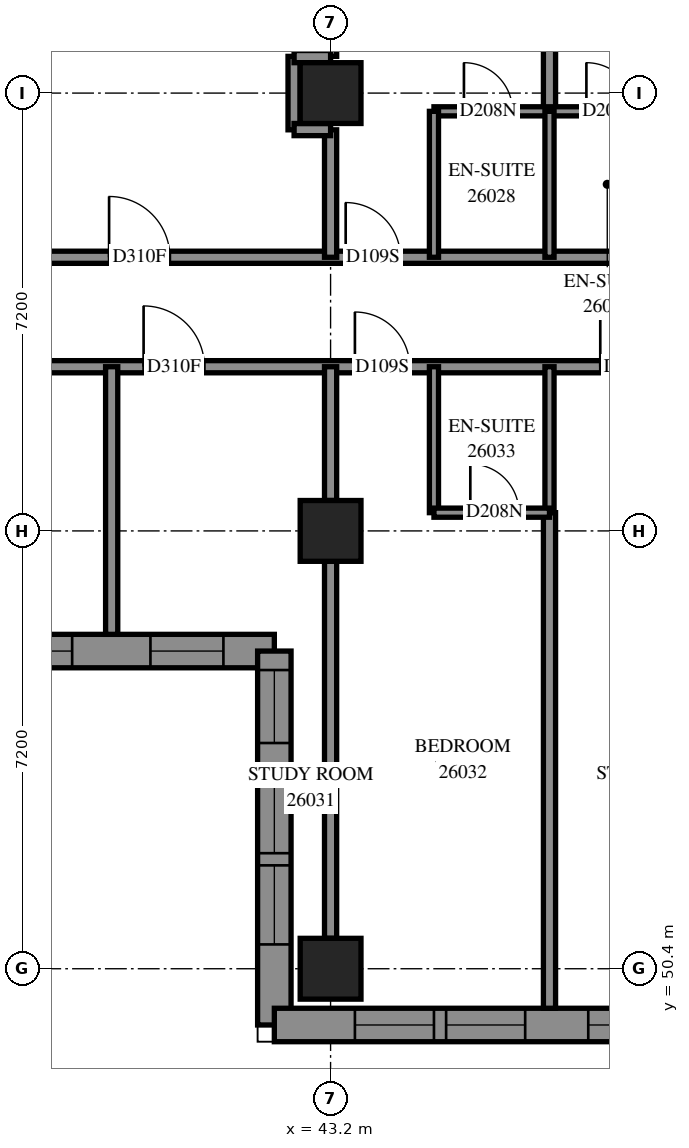
"""IFC4 building model, lengths in metres.
Left out: names, types, materials, properties, quantities, classifications, styles, units other than length and angle.
Written with IfcOpenShell. Run it as: python <this file> out.ifc"""

import sys

from ifc_helpers import new_model, si_unit, direction, frame, frame_2d, origin, origin_2d, place, context, subcontext, project, spatial, polyline, rectangle, outline, extrude, element, fill, save


model = new_model("IFC4")
c1 = context("Model", 3, precision=1e-05, world=origin(), true_north=direction((0.0, 1.0)))
c2 = subcontext(c1, "Body", "Model", "MODEL_VIEW")
j1 = project(units=[si_unit("LENGTHUNIT", "METRE"), si_unit("PLANEANGLEUNIT", "RADIAN")], contexts=[c1])
p1 = place(None, origin())
s1 = spatial("IfcSite", under=j1, at=p1, CompositionType="ELEMENT")
p2 = place(p1, origin())
s2 = spatial("IfcBuilding", under=s1, at=p2, CompositionType="ELEMENT")
p3 = place(p2, frame((0.0, 0.0, 98.2)))
s3 = spatial("IfcBuildingStorey", under=s2, at=p3, CompositionType="ELEMENT", Elevation=98.2)
for number, where, z_axis, x_axis in (
    (1, (43.2, 50.4, 0.0), (0.0, 0.0, 1.0), (1.0, 0.0, 0.0)),
    (2, (43.2, 57.6, 0.0), (0.0, 0.0, 1.0), (1.0, 0.0, 0.0)),
    (3, (43.2, 64.8, 0.0), (0.0, 0.0, 1.0), (1.0, 0.0, 0.0)),
):
    element("IfcColumn", number, at=place(p3, frame(where, z_axis=z_axis, x_axis=x_axis)), inside=s3, PredefinedType="COLUMN", context=c2, shape_type="SweptSolid", body=[
        extrude(rectangle(XDim=1.0, YDim=1.0, at=origin_2d()), origin(), (0.0, 0.0, 1.0), 3.1),
    ])
p4 = place(p3, frame((27.875, 55.624, 0.0), z_axis=(0.0, 0.0, 1.0), x_axis=(1.0, 0.0, 0.0)))
e4 = element("IfcWall", 4, at=p4, inside=s3, PredefinedType="SOLIDWALL", context=c2, shape_type="SweptSolid", body=[
    extrude(outline(polyline([(-0.275, -0.275), (14.125, -0.275), (14.675, 0.275), (0.275, 0.275), (-0.275, -0.275)])), origin(), (0.0, 0.0, 1.0), 3.1),
])
p5 = place(p4, frame((1.175, 0.0, 0.5)))
e5 = element("IfcOpeningElement", 5, at=p5, cuts=e4, PredefinedType="OPENING", context=c2, shape_type="SweptSolid", body=[
    extrude(rectangle(XDim=1.3, YDim=2.45, at=frame_2d((0.65, 1.225))), frame((0.0, 0.285, 0.0), z_axis=(0.0, -1.0, 0.0), x_axis=(1.0, 0.0, 0.0)), (0.0, 0.0, 1.0), 0.57),
])
p6 = place(p4, frame((2.675, 0.0, 0.5)))
e6 = element("IfcOpeningElement", 6, at=p6, cuts=e4, PredefinedType="OPENING", context=c2, shape_type="SweptSolid", body=[
    extrude(rectangle(XDim=1.3, YDim=2.45, at=frame_2d((0.65, 1.225))), frame((0.0, 0.285, 0.0), z_axis=(0.0, -1.0, 0.0), x_axis=(1.0, 0.0, 0.0)), (0.0, 0.0, 1.0), 0.57),
])
p7 = place(p4, frame((4.925, 0.0, 0.5)))
e7 = element("IfcOpeningElement", 7, at=p7, cuts=e4, PredefinedType="OPENING", context=c2, shape_type="SweptSolid", body=[
    extrude(rectangle(XDim=1.3, YDim=2.45, at=frame_2d((0.65, 1.225))), frame((0.0, 0.285, 0.0), z_axis=(0.0, -1.0, 0.0), x_axis=(1.0, 0.0, 0.0)), (0.0, 0.0, 1.0), 0.57),
])
p8 = place(p4, frame((6.425, 0.0, 0.5)))
e8 = element("IfcOpeningElement", 8, at=p8, cuts=e4, PredefinedType="OPENING", context=c2, shape_type="SweptSolid", body=[
    extrude(rectangle(XDim=1.3, YDim=2.45, at=frame_2d((0.65, 1.225))), frame((0.0, 0.285, 0.0), z_axis=(0.0, -1.0, 0.0), x_axis=(1.0, 0.0, 0.0)), (0.0, 0.0, 1.0), 0.57),
])
p9 = place(p4, frame((8.275, 0.0, 0.5)))
e9 = element("IfcOpeningElement", 9, at=p9, cuts=e4, PredefinedType="OPENING", context=c2, shape_type="SweptSolid", body=[
    extrude(rectangle(XDim=1.3, YDim=2.45, at=frame_2d((0.65, 1.225))), frame((0.0, 0.285, 0.0), z_axis=(0.0, -1.0, 0.0), x_axis=(1.0, 0.0, 0.0)), (0.0, 0.0, 1.0), 0.57),
])
p10 = place(p4, frame((9.775, 0.0, 0.5)))
e10 = element("IfcOpeningElement", 10, at=p10, cuts=e4, PredefinedType="OPENING", context=c2, shape_type="SweptSolid", body=[
    extrude(rectangle(XDim=1.3, YDim=2.45, at=frame_2d((0.65, 1.225))), frame((0.0, 0.285, 0.0), z_axis=(0.0, -1.0, 0.0), x_axis=(1.0, 0.0, 0.0)), (0.0, 0.0, 1.0), 0.57),
])
p11 = place(p4, frame((12.363, 0.0, 0.5)))
e11 = element("IfcOpeningElement", 11, at=p11, cuts=e4, PredefinedType="OPENING", context=c2, shape_type="SweptSolid", body=[
    extrude(rectangle(XDim=1.2, YDim=2.45, at=frame_2d((0.6, 1.225))), frame((0.0, 0.285, 0.0), z_axis=(0.0, -1.0, 0.0), x_axis=(1.0, 0.0, 0.0)), (0.0, 0.0, 1.0), 0.57),
])
p12 = place(p3, frame((42.275, 55.624, 0.0), z_axis=(0.0, 0.0, 1.0), x_axis=(0.0, -1.0, 0.0)))
e12 = element("IfcWall", 12, at=p12, inside=s3, PredefinedType="SOLIDWALL", context=c2, shape_type="SweptSolid", body=[
    extrude(outline(polyline([(0.275, -0.275), (6.424, -0.275), (5.874, 0.275), (-0.275, 0.275), (0.275, -0.275)])), origin(), (0.0, 0.0, 1.0), 3.1),
])
p13 = place(p12, frame((2.024, 0.0, 0.5)))
e13 = element("IfcOpeningElement", 13, at=p13, cuts=e12, PredefinedType="OPENING", context=c2, shape_type="SweptSolid", body=[
    extrude(rectangle(XDim=1.3, YDim=2.45, at=frame_2d((0.65, 1.225))), frame((0.0, 0.285, 0.0), z_axis=(0.0, -1.0, 0.0), x_axis=(1.0, 0.0, 0.0)), (0.0, 0.0, 1.0), 0.57),
])
p14 = place(p12, frame((3.524, 0.0, 0.5)))
e14 = element("IfcOpeningElement", 14, at=p14, cuts=e12, PredefinedType="OPENING", context=c2, shape_type="SweptSolid", body=[
    extrude(rectangle(XDim=1.3, YDim=2.45, at=frame_2d((0.65, 1.225))), frame((0.0, 0.285, 0.0), z_axis=(0.0, -1.0, 0.0), x_axis=(1.0, 0.0, 0.0)), (0.0, 0.0, 1.0), 0.57),
])
p15 = place(p12, frame((0.312, 0.0, 0.5)))
e15 = element("IfcOpeningElement", 15, at=p15, cuts=e12, PredefinedType="OPENING", context=c2, shape_type="SweptSolid", body=[
    extrude(rectangle(XDim=1.2, YDim=2.45, at=frame_2d((0.6, 1.225))), frame((0.0, 0.285, 0.0), z_axis=(0.0, -1.0, 0.0), x_axis=(1.0, 0.0, 0.0)), (0.0, 0.0, 1.0), 0.57),
])
p16 = place(p3, frame((42.275, 49.475, 0.0), z_axis=(0.0, 0.0, 1.0), x_axis=(1.0, 0.0, 0.0)))
e16 = element("IfcWall", 16, at=p16, inside=s3, PredefinedType="SOLIDWALL", context=c2, shape_type="SweptSolid", body=[
    extrude(outline(polyline([(-0.275, -0.275), (6.925, -0.275), (7.475, 0.275), (0.275, 0.275), (-0.275, -0.275)])), origin(), (0.0, 0.0, 1.0), 3.1),
])
p17 = place(p16, frame((1.325, 0.0, 0.5)))
e17 = element("IfcOpeningElement", 17, at=p17, cuts=e16, PredefinedType="OPENING", context=c2, shape_type="SweptSolid", body=[
    extrude(rectangle(XDim=1.3, YDim=2.45, at=frame_2d((0.65, 1.225))), frame((0.0, 0.285, 0.0), z_axis=(0.0, -1.0, 0.0), x_axis=(1.0, 0.0, 0.0)), (0.0, 0.0, 1.0), 0.57),
])
p18 = place(p16, frame((2.825, 0.0, 0.5)))
e18 = element("IfcOpeningElement", 18, at=p18, cuts=e16, PredefinedType="OPENING", context=c2, shape_type="SweptSolid", body=[
    extrude(rectangle(XDim=1.3, YDim=2.45, at=frame_2d((0.65, 1.225))), frame((0.0, 0.285, 0.0), z_axis=(0.0, -1.0, 0.0), x_axis=(1.0, 0.0, 0.0)), (0.0, 0.0, 1.0), 0.57),
])
p19 = place(p16, frame((5.162, 0.0, 0.5)))
e19 = element("IfcOpeningElement", 19, at=p19, cuts=e16, PredefinedType="OPENING", context=c2, shape_type="SweptSolid", body=[
    extrude(rectangle(XDim=1.2, YDim=2.45, at=frame_2d((0.6, 1.225))), frame((0.0, 0.285, 0.0), z_axis=(0.0, -1.0, 0.0), x_axis=(1.0, 0.0, 0.0)), (0.0, 0.0, 1.0), 0.57),
])
p20 = place(p3, frame((28.802, 60.3, 0.0), z_axis=(0.0, 0.0, 1.0), x_axis=(1.0, 0.0, 0.0)))
e20 = element("IfcWall", 20, at=p20, inside=s3, PredefinedType="PARTITIONING", context=c2, shape_type="SweptSolid", body=[
    extrude(rectangle(XDim=24.298, YDim=0.2, at=frame_2d((12.149, 0.0))), origin(), (0.0, 0.0, 1.0), 3.1),
])
p21 = place(p20, frame((5.972, 0.0, 0.0)))
e21 = element("IfcOpeningElement", 21, at=p21, cuts=e20, PredefinedType="OPENING", context=c2, shape_type="SweptSolid", body=[
    extrude(rectangle(XDim=1.0, YDim=2.1, at=frame_2d((0.5, 1.05))), frame((0.0, 0.11, 0.0), z_axis=(0.0, -1.0, 0.0), x_axis=(1.0, 0.0, 0.0)), (0.0, 0.0, 1.0), 0.22),
])
p22 = place(p20, frame((11.323, 0.0, 0.0)))
e22 = element("IfcOpeningElement", 22, at=p22, cuts=e20, PredefinedType="OPENING", context=c2, shape_type="SweptSolid", body=[
    extrude(rectangle(XDim=1.0, YDim=2.1, at=frame_2d((0.5, 1.05))), frame((0.0, 0.11, 0.0), z_axis=(0.0, -1.0, 0.0), x_axis=(1.0, 0.0, 0.0)), (0.0, 0.0, 1.0), 0.22),
])
p23 = place(p20, frame((14.798, 0.0, 0.0)))
e23 = element("IfcOpeningElement", 23, at=p23, cuts=e20, PredefinedType="OPENING", context=c2, shape_type="SweptSolid", body=[
    extrude(rectangle(XDim=0.9, YDim=2.1, at=frame_2d((0.45, 1.05))), frame((0.0, 0.11, 0.0), z_axis=(0.0, -1.0, 0.0), x_axis=(1.0, 0.0, 0.0)), (0.0, 0.0, 1.0), 0.22),
])
p24 = place(p20, frame((18.833, 0.0, 0.0)))
e24 = element("IfcOpeningElement", 24, at=p24, cuts=e20, PredefinedType="OPENING", context=c2, shape_type="SweptSolid", body=[
    extrude(rectangle(XDim=1.0, YDim=2.1, at=frame_2d((0.5, 1.05))), frame((0.0, 0.11, 0.0), z_axis=(0.0, -1.0, 0.0), x_axis=(1.0, 0.0, 0.0)), (0.0, 0.0, 1.0), 0.22),
])
p25 = place(p20, frame((23.151, 0.0, 0.0)))
e25 = element("IfcOpeningElement", 25, at=p25, cuts=e20, PredefinedType="OPENING", context=c2, shape_type="SweptSolid", body=[
    extrude(rectangle(XDim=1.0, YDim=2.1, at=frame_2d((0.5, 1.05))), frame((0.0, 0.11, 0.0), z_axis=(0.0, -1.0, 0.0), x_axis=(1.0, 0.0, 0.0)), (0.0, 0.0, 1.0), 0.22),
])
p26 = place(p3, frame((33.3, 62.1, 0.0), z_axis=(0.0, 0.0, 1.0), x_axis=(1.0, 0.0, 0.0)))
e26 = element("IfcWall", 26, at=p26, inside=s3, PredefinedType="PARTITIONING", context=c2, shape_type="SweptSolid", body=[
    extrude(rectangle(XDim=17.1, YDim=0.2, at=frame_2d((8.55, 0.0))), origin(), (0.0, 0.0, 1.0), 3.1),
])
p27 = place(p26, frame((6.258, 0.0, 0.0)))
e27 = element("IfcOpeningElement", 27, at=p27, cuts=e26, PredefinedType="OPENING", context=c2, shape_type="SweptSolid", body=[
    extrude(rectangle(XDim=1.0, YDim=2.1, at=frame_2d((0.5, 1.05))), frame((0.0, 0.11, 0.0), z_axis=(0.0, -1.0, 0.0), x_axis=(1.0, 0.0, 0.0)), (0.0, 0.0, 1.0), 0.22),
])
p28 = place(p26, frame((10.148, 0.0, 0.0)))
e28 = element("IfcOpeningElement", 28, at=p28, cuts=e26, PredefinedType="OPENING", context=c2, shape_type="SweptSolid", body=[
    extrude(rectangle(XDim=0.9, YDim=2.1, at=frame_2d((0.45, 1.05))), frame((0.0, 0.11, 0.0), z_axis=(0.0, -1.0, 0.0), x_axis=(1.0, 0.0, 0.0)), (0.0, 0.0, 1.0), 0.22),
])
p29 = place(p26, frame((15.729, 0.0, 0.0)))
e29 = element("IfcOpeningElement", 29, at=p29, cuts=e26, PredefinedType="OPENING", context=c2, shape_type="SweptSolid", body=[
    extrude(rectangle(XDim=0.9, YDim=2.1, at=frame_2d((0.45, 1.05))), frame((0.0, 0.11, 0.0), z_axis=(0.0, -1.0, 0.0), x_axis=(1.0, 0.0, 0.0)), (0.0, 0.0, 1.0), 0.22),
])
p30 = place(p3, frame((46.8, 64.5, 0.0), z_axis=(0.0, 0.0, 1.0), x_axis=(0.0, 1.0, 0.0)))
e30 = element("IfcWall", 30, at=p30, inside=s3, PredefinedType="PARTITIONING", context=c2, shape_type="SweptSolid", body=[
    extrude(rectangle(XDim=8.248, YDim=0.2, at=frame_2d((4.124, 0.0))), origin(), (0.0, 0.0, 1.0), 3.1),
])
p31 = place(p3, frame((46.8, 49.75, 0.0), z_axis=(0.0, 0.0, 1.0), x_axis=(0.0, 1.0, 0.0)))
e31 = element("IfcWall", 31, at=p31, inside=s3, PredefinedType="PARTITIONING", context=c2, shape_type="SweptSolid", body=[
    extrude(rectangle(XDim=8.15, YDim=0.2, at=frame_2d((4.075, 0.0))), origin(), (0.0, 0.0, 1.0), 3.1),
])
p32 = place(p3, frame((43.2, 50.9, 0.0), z_axis=(0.0, 0.0, 1.0), x_axis=(0.0, 1.0, 0.0)))
e32 = element("IfcWall", 32, at=p32, inside=s3, PredefinedType="PARTITIONING", context=c2, shape_type="SweptSolid", body=[
    extrude(rectangle(XDim=6.2, YDim=0.2, at=frame_2d((3.1, 0.0))), origin(), (0.0, 0.0, 1.0), 2.6),
])
p33 = place(p3, frame((43.2, 65.404, 0.0), z_axis=(0.0, 0.0, 1.0), x_axis=(0.0, 1.0, 0.0)))
e33 = element("IfcWall", 33, at=p33, inside=s3, PredefinedType="PARTITIONING", context=c2, shape_type="SweptSolid", body=[
    extrude(rectangle(XDim=5.992, YDim=0.2, at=frame_2d((2.996, 0.0))), origin(), (0.0, 0.0, 1.0), 3.1),
])
p34 = place(p3, frame((39.6, 55.899, 0.0), z_axis=(0.0, 0.0, 1.0), x_axis=(0.0, 1.0, 0.0)))
e34 = element("IfcWall", 34, at=p34, inside=s3, PredefinedType="PARTITIONING", context=c2, shape_type="SweptSolid", body=[
    extrude(rectangle(XDim=4.401, YDim=0.2, at=frame_2d((2.2, 0.0))), origin(), (0.0, 0.0, 1.0), 3.1),
])
p35 = place(p3, frame((44.9, 64.5, 0.0), z_axis=(0.0, 0.0, 1.0), x_axis=(1.0, 0.0, 0.0)))
e35 = element("IfcWall", 35, at=p35, inside=s3, PredefinedType="PARTITIONING", context=c2, shape_type="SweptSolid", body=[
    extrude(rectangle(XDim=3.8, YDim=0.15, at=frame_2d((1.9, 0.0))), origin(), (0.0, 0.0, 1.0), 3.1),
])
p36 = place(p35, frame((0.493, 0.0, 0.0)))
e36 = element("IfcOpeningElement", 36, at=p36, cuts=e35, PredefinedType="OPENING", context=c2, shape_type="SweptSolid", body=[
    extrude(rectangle(XDim=0.8, YDim=2.1, at=frame_2d((0.4, 1.05))), frame((0.0, 0.085, 0.0), z_axis=(0.0, -1.0, 0.0), x_axis=(1.0, 0.0, 0.0)), (0.0, 0.0, 1.0), 0.17),
])
p37 = place(p35, frame((2.507, 0.0, 0.0)))
e37 = element("IfcOpeningElement", 37, at=p37, cuts=e35, PredefinedType="OPENING", context=c2, shape_type="SweptSolid", body=[
    extrude(rectangle(XDim=0.8, YDim=2.1, at=frame_2d((0.4, 1.05))), frame((0.0, 0.085, 0.0), z_axis=(0.0, -1.0, 0.0), x_axis=(1.0, 0.0, 0.0)), (0.0, 0.0, 1.0), 0.17),
])
for number, where, z_axis, x_axis in (
    (38, (44.9, 57.9, 0.0), (0.0, 0.0, 1.0), (0.0, 1.0, 0.0)),
    (39, (44.9, 62.1, 0.0), (0.0, 0.0, 1.0), (0.0, 1.0, 0.0)),
    (40, (46.8, 57.9, 0.0), (0.0, 0.0, 1.0), (0.0, 1.0, 0.0)),
    (41, (46.8, 62.1, 0.0), (0.0, 0.0, 1.0), (0.0, 1.0, 0.0)),
):
    element("IfcWall", number, at=place(p3, frame(where, z_axis=z_axis, x_axis=x_axis)), inside=s3, PredefinedType="PARTITIONING", context=c2, shape_type="SweptSolid", body=[
        extrude(rectangle(XDim=2.4, YDim=0.15, at=frame_2d((1.2, 0.0))), origin(), (0.0, 0.0, 1.0), 3.1),
    ])
p38 = place(p3, frame((43.2, 58.1, 0.0), z_axis=(0.0, 0.0, 1.0), x_axis=(0.0, 1.0, 0.0)))
e42 = element("IfcWall", 42, at=p38, inside=s3, PredefinedType="PARTITIONING", context=c2, shape_type="SweptSolid", body=[
    extrude(rectangle(XDim=2.2, YDim=0.2, at=frame_2d((1.1, 0.0))), origin(), (0.0, 0.0, 1.0), 3.1),
])
p39 = place(p3, frame((43.2, 62.1, 0.0), z_axis=(0.0, 0.0, 1.0), x_axis=(0.0, 1.0, 0.0)))
e43 = element("IfcWall", 43, at=p39, inside=s3, PredefinedType="PARTITIONING", context=c2, shape_type="SweptSolid", body=[
    extrude(rectangle(XDim=2.096, YDim=0.2, at=frame_2d((1.048, 0.0))), origin(), (0.0, 0.0, 1.0), 3.1),
])
p40 = place(p3, frame((44.9, 57.9, 0.0), z_axis=(0.0, 0.0, 1.0), x_axis=(1.0, 0.0, 0.0)))
e44 = element("IfcWall", 44, at=p40, inside=s3, PredefinedType="PARTITIONING", context=c2, shape_type="SweptSolid", body=[
    extrude(rectangle(XDim=1.9, YDim=0.15, at=frame_2d((0.95, 0.0))), origin(), (0.0, 0.0, 1.0), 3.1),
])
p41 = place(p40, frame((0.598, 0.0, 0.0)))
e45 = element("IfcOpeningElement", 45, at=p41, cuts=e44, PredefinedType="OPENING", context=c2, shape_type="SweptSolid", body=[
    extrude(rectangle(XDim=0.8, YDim=2.1, at=frame_2d((0.4, 1.05))), frame((0.0, 0.085, 0.0), z_axis=(0.0, -1.0, 0.0), x_axis=(1.0, 0.0, 0.0)), (0.0, 0.0, 1.0), 0.17),
])
p42 = place(p3, frame((42.6, 64.196, 0.0), z_axis=(0.0, 0.0, 1.0), x_axis=(0.0, 1.0, 0.0)))
e46 = element("IfcWall", 46, at=p42, inside=s3, PredefinedType="PARTITIONING", context=c2, shape_type="SweptSolid", body=[
    extrude(rectangle(XDim=1.208, YDim=0.2, at=frame_2d((0.604, 0.0))), origin(), (0.0, 0.0, 1.0), 3.1),
])
for number, where, z_axis, x_axis in (
    (47, (42.6, 65.4, 0.0), (0.0, 0.0, 1.0), (1.0, 0.0, 0.0)),
    (48, (42.6, 64.2, 0.0), (0.0, 0.0, 1.0), (1.0, 0.0, 0.0)),
):
    element("IfcWall", number, at=place(p3, frame(where, z_axis=z_axis, x_axis=x_axis)), inside=s3, PredefinedType="PARTITIONING", context=c2, shape_type="SweptSolid", body=[
        extrude(rectangle(XDim=0.6, YDim=0.2, at=frame_2d((0.3, 0.0))), origin(), (0.0, 0.0, 1.0), 3.1),
    ])
p43 = place(p10, origin())
e49 = element("IfcWindow", 49, at=p43, inside=s3, PartitioningType="SINGLE_PANEL", PredefinedType="WINDOW", context=c2, shape_type="SweptSolid", body=[
    extrude(rectangle(XDim=1.3, YDim=2.45, at=frame_2d((0.65, 1.225))), frame((0.0, 0.155, 0.0), z_axis=(0.0, -1.0, 0.0), x_axis=(1.0, 0.0, 0.0)), (0.0, 0.0, 1.0), 0.06),
])
fill(e10, e49)
p44 = place(p11, origin())
e50 = element("IfcWindow", 50, at=p44, inside=s3, PartitioningType="SINGLE_PANEL", PredefinedType="WINDOW", context=c2, shape_type="SweptSolid", body=[
    extrude(rectangle(XDim=1.2, YDim=2.45, at=frame_2d((0.6, 1.225))), frame((0.0, 0.155, 0.0), z_axis=(0.0, -1.0, 0.0), x_axis=(1.0, 0.0, 0.0)), (0.0, 0.0, 1.0), 0.06),
])
fill(e11, e50)
p45 = place(p13, origin())
e51 = element("IfcWindow", 51, at=p45, inside=s3, PartitioningType="SINGLE_PANEL", PredefinedType="WINDOW", context=c2, shape_type="SweptSolid", body=[
    extrude(rectangle(XDim=1.3, YDim=2.45, at=frame_2d((0.65, 1.225))), frame((0.0, 0.155, 0.0), z_axis=(0.0, -1.0, 0.0), x_axis=(1.0, 0.0, 0.0)), (0.0, 0.0, 1.0), 0.06),
])
fill(e13, e51)
p46 = place(p14, origin())
e52 = element("IfcWindow", 52, at=p46, inside=s3, PartitioningType="SINGLE_PANEL", PredefinedType="WINDOW", context=c2, shape_type="SweptSolid", body=[
    extrude(rectangle(XDim=1.3, YDim=2.45, at=frame_2d((0.65, 1.225))), frame((0.0, 0.155, 0.0), z_axis=(0.0, -1.0, 0.0), x_axis=(1.0, 0.0, 0.0)), (0.0, 0.0, 1.0), 0.06),
])
fill(e14, e52)
p47 = place(p15, origin())
e53 = element("IfcWindow", 53, at=p47, inside=s3, PartitioningType="SINGLE_PANEL", PredefinedType="WINDOW", context=c2, shape_type="SweptSolid", body=[
    extrude(rectangle(XDim=1.2, YDim=2.45, at=frame_2d((0.6, 1.225))), frame((0.0, 0.155, 0.0), z_axis=(0.0, -1.0, 0.0), x_axis=(1.0, 0.0, 0.0)), (0.0, 0.0, 1.0), 0.06),
])
fill(e15, e53)
p48 = place(p17, origin())
e54 = element("IfcWindow", 54, at=p48, inside=s3, PartitioningType="SINGLE_PANEL", PredefinedType="WINDOW", context=c2, shape_type="SweptSolid", body=[
    extrude(rectangle(XDim=1.3, YDim=2.45, at=frame_2d((0.65, 1.225))), frame((0.0, 0.155, 0.0), z_axis=(0.0, -1.0, 0.0), x_axis=(1.0, 0.0, 0.0)), (0.0, 0.0, 1.0), 0.06),
])
fill(e17, e54)
p49 = place(p18, origin())
e55 = element("IfcWindow", 55, at=p49, inside=s3, PartitioningType="SINGLE_PANEL", PredefinedType="WINDOW", context=c2, shape_type="SweptSolid", body=[
    extrude(rectangle(XDim=1.3, YDim=2.45, at=frame_2d((0.65, 1.225))), frame((0.0, 0.155, 0.0), z_axis=(0.0, -1.0, 0.0), x_axis=(1.0, 0.0, 0.0)), (0.0, 0.0, 1.0), 0.06),
])
fill(e18, e55)
p50 = place(p19, origin())
e56 = element("IfcWindow", 56, at=p50, inside=s3, PartitioningType="SINGLE_PANEL", PredefinedType="WINDOW", context=c2, shape_type="SweptSolid", body=[
    extrude(rectangle(XDim=1.2, YDim=2.45, at=frame_2d((0.6, 1.225))), frame((0.0, 0.155, 0.0), z_axis=(0.0, -1.0, 0.0), x_axis=(1.0, 0.0, 0.0)), (0.0, 0.0, 1.0), 0.06),
])
fill(e19, e56)
p51 = place(p27, origin())
e57 = element("IfcDoor", 57, at=p51, inside=s3, OperationType="SINGLE_SWING_RIGHT", PredefinedType="DOOR", context=c2, shape_type="SweptSolid", body=[
    extrude(rectangle(XDim=1.0, YDim=2.1, at=frame_2d((0.5, 1.05))), frame((0.0, 0.025, 0.0), z_axis=(0.0, -1.0, 0.0), x_axis=(1.0, 0.0, 0.0)), (0.0, 0.0, 1.0), 0.05),
])
fill(e27, e57)
p52 = place(p28, origin())
e58 = element("IfcDoor", 58, at=p52, inside=s3, OperationType="SINGLE_SWING_RIGHT", PredefinedType="DOOR", context=c2, shape_type="SweptSolid", body=[
    extrude(rectangle(XDim=0.9, YDim=2.1, at=frame_2d((0.45, 1.05))), frame((0.0, 0.025, 0.0), z_axis=(0.0, -1.0, 0.0), x_axis=(1.0, 0.0, 0.0)), (0.0, 0.0, 1.0), 0.05),
])
fill(e28, e58)
p53 = place(p36, origin())
e59 = element("IfcDoor", 59, at=p53, inside=s3, OperationType="SINGLE_SWING_RIGHT", PredefinedType="DOOR", context=c2, shape_type="SweptSolid", body=[
    extrude(rectangle(XDim=0.8, YDim=2.1, at=frame_2d((0.4, 1.05))), frame((0.0, 0.025, 0.0), z_axis=(0.0, -1.0, 0.0), x_axis=(1.0, 0.0, 0.0)), (0.0, 0.0, 1.0), 0.05),
])
fill(e36, e59)
p54 = place(p37, origin())
e60 = element("IfcDoor", 60, at=p54, inside=s3, OperationType="SINGLE_SWING_RIGHT", PredefinedType="DOOR", context=c2, shape_type="SweptSolid", body=[
    extrude(rectangle(XDim=0.8, YDim=2.1, at=frame_2d((0.4, 1.05))), frame((0.0, 0.025, 0.0), z_axis=(0.0, -1.0, 0.0), x_axis=(1.0, 0.0, 0.0)), (0.0, 0.0, 1.0), 0.05),
])
fill(e37, e60)
p55 = place(p22, origin())
e61 = element("IfcDoor", 61, at=p55, inside=s3, OperationType="SINGLE_SWING_RIGHT", PredefinedType="DOOR", context=c2, shape_type="SweptSolid", body=[
    extrude(rectangle(XDim=1.0, YDim=2.1, at=frame_2d((0.5, 1.05))), frame((0.0, 0.025, 0.0), z_axis=(0.0, -1.0, 0.0), x_axis=(1.0, 0.0, 0.0)), (0.0, 0.0, 1.0), 0.05),
])
fill(e22, e61)
p56 = place(p23, origin())
e62 = element("IfcDoor", 62, at=p56, inside=s3, OperationType="SINGLE_SWING_LEFT", PredefinedType="DOOR", context=c2, shape_type="SweptSolid", body=[
    extrude(rectangle(XDim=0.9, YDim=2.1, at=frame_2d((0.45, 1.05))), frame((0.0, 0.025, 0.0), z_axis=(0.0, -1.0, 0.0), x_axis=(1.0, 0.0, 0.0)), (0.0, 0.0, 1.0), 0.05),
])
fill(e23, e62)
p57 = place(p41, origin())
e63 = element("IfcDoor", 63, at=p57, inside=s3, OperationType="SINGLE_SWING_RIGHT", PredefinedType="DOOR", context=c2, shape_type="SweptSolid", body=[
    extrude(rectangle(XDim=0.8, YDim=2.1, at=frame_2d((0.4, 1.05))), frame((0.0, 0.025, 0.0), z_axis=(0.0, -1.0, 0.0), x_axis=(1.0, 0.0, 0.0)), (0.0, 0.0, 1.0), 0.05),
])
fill(e45, e63)
p58 = place(p24, origin())
e64 = element("IfcDoor", 64, at=p58, inside=s3, OperationType="SINGLE_SWING_RIGHT", PredefinedType="DOOR", context=c2, shape_type="SweptSolid", body=[
    extrude(rectangle(XDim=1.0, YDim=2.1, at=frame_2d((0.5, 1.05))), frame((0.0, 0.025, 0.0), z_axis=(0.0, -1.0, 0.0), x_axis=(1.0, 0.0, 0.0)), (0.0, 0.0, 1.0), 0.05),
])
fill(e24, e64)
save(model, sys.argv[1])
